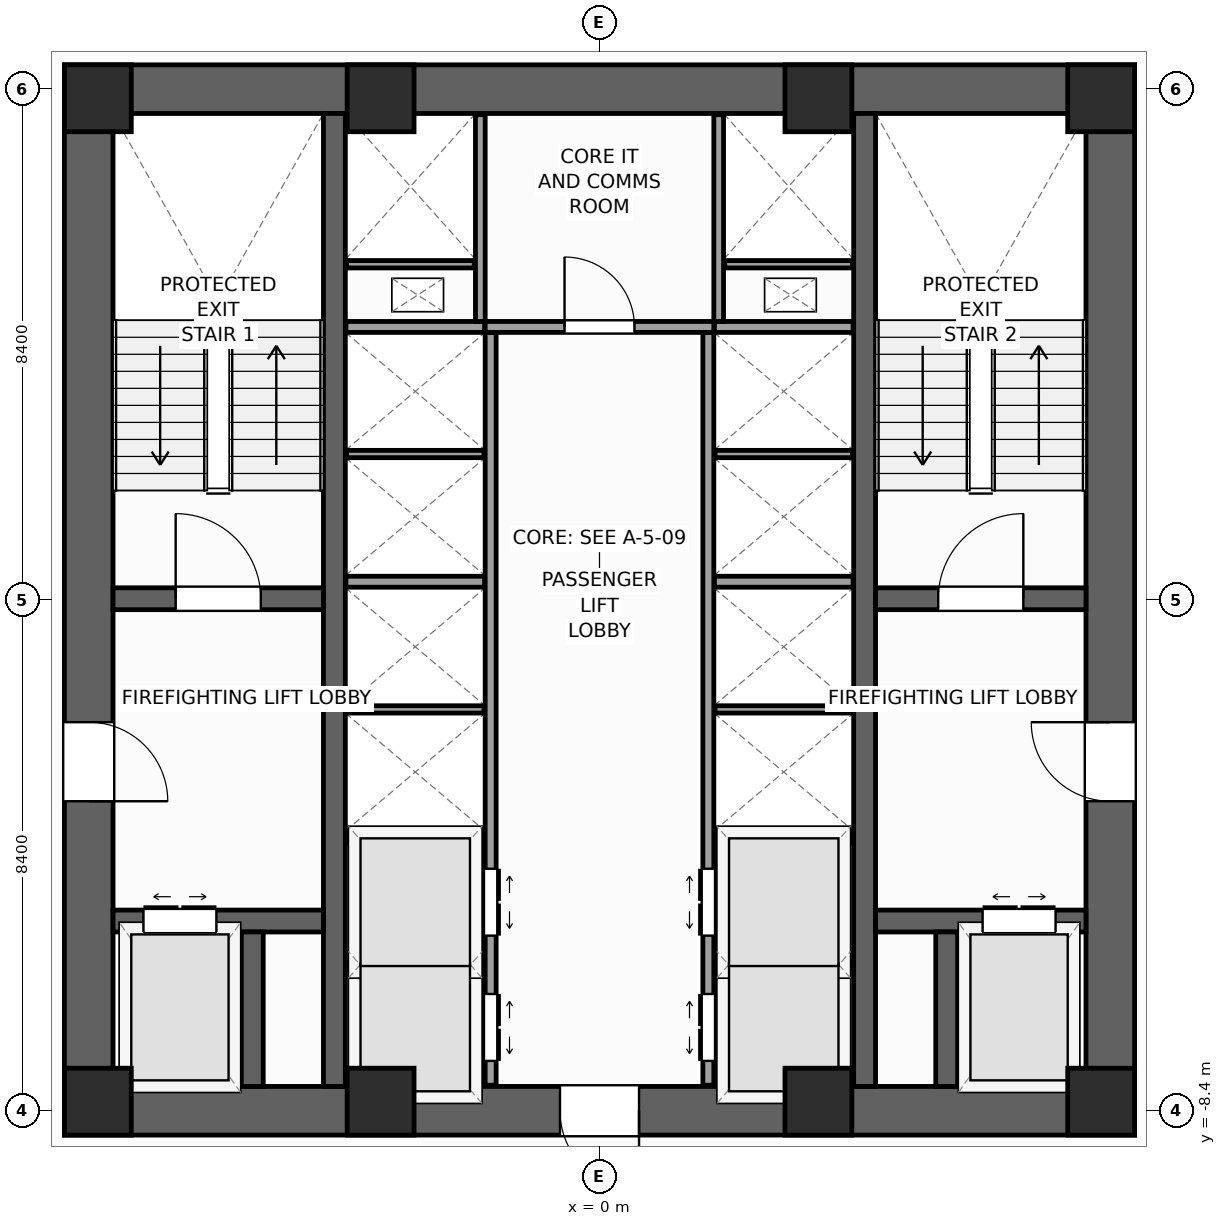
"""IFC4 building model, lengths in metres.
Left out: names, types, materials, properties, quantities, classifications, styles, units other than length and angle.
Written with IfcOpenShell. Run it as: python <this file> out.ifc"""

import sys

from ifc_helpers import new_model, si_unit, direction, frame, frame_2d, origin, origin_2d, place, context, subcontext, project, spatial, rectangle, extrude, source, transform, mapped, element, fill, save


model = new_model("IFC4")
c1 = context("Model", 3, precision=1e-05, world=origin(), true_north=direction((0.0, 1.0)))
c2 = subcontext(c1, "Body", "Model", "MODEL_VIEW")
j1 = project(units=[si_unit("LENGTHUNIT", "METRE"), si_unit("PLANEANGLEUNIT", "RADIAN")], contexts=[c1])
p1 = place(None, origin())
s1 = spatial("IfcSite", under=j1, at=p1, CompositionType="ELEMENT")
p2 = place(p1, origin())
s2 = spatial("IfcBuilding", under=s1, at=p2, CompositionType="ELEMENT")
p3 = place(p2, frame((0.0, 0.0, 70.0)))
s3 = spatial("IfcBuildingStorey", under=s2, at=p3, CompositionType="ELEMENT", Elevation=70.0)
p4 = place(p3, frame((-8.8, -8.4, 0.0), z_axis=(0.0, 0.0, 1.0), x_axis=(1.0, 0.0, 0.0)))
e1 = element("IfcWall", 1, at=p4, inside=s3, PredefinedType="SHEAR", context=c2, shape_type="SweptSolid", body=[
    extrude(rectangle(XDim=17.6, YDim=0.8, at=frame_2d((8.8, 0.0))), origin(), (0.0, 0.0, 1.0), 4.0),
])
p5 = place(p4, frame((8.15, 0.0, 0.0)))
e2 = element("IfcOpeningElement", 2, at=p5, cuts=e1, PredefinedType="OPENING", context=c2, shape_type="SweptSolid", body=[
    extrude(rectangle(XDim=1.3, YDim=2.2, at=frame_2d((0.65, 1.1))), frame((0.0, 0.41, 0.0), z_axis=(0.0, -1.0, 0.0), x_axis=(1.0, 0.0, 0.0)), (0.0, 0.0, 1.0), 0.82),
])
p6 = place(p3, frame((-8.8, 8.4, 0.0), z_axis=(0.0, 0.0, 1.0), x_axis=(1.0, 0.0, 0.0)))
e3 = element("IfcWall", 3, at=p6, inside=s3, PredefinedType="SHEAR", context=c2, shape_type="SweptSolid", body=[
    extrude(rectangle(XDim=17.6, YDim=0.8, at=frame_2d((8.8, 0.0))), origin(), (0.0, 0.0, 1.0), 4.0),
])
p7 = place(p3, frame((-8.4, -8.0, 0.0), z_axis=(0.0, 0.0, 1.0), x_axis=(0.0, 1.0, 0.0)))
e4 = element("IfcWall", 4, at=p7, inside=s3, PredefinedType="SHEAR", context=c2, shape_type="SweptSolid", body=[
    extrude(rectangle(XDim=16.0, YDim=0.8, at=frame_2d((8.0, 0.0))), origin(), (0.0, 0.0, 1.0), 4.0),
])
p8 = place(p7, frame((4.69, 0.0, 0.0)))
e5 = element("IfcOpeningElement", 5, at=p8, cuts=e4, PredefinedType="OPENING", context=c2, shape_type="SweptSolid", body=[
    extrude(rectangle(XDim=1.3, YDim=2.2, at=frame_2d((0.65, 1.1))), frame((0.0, 0.41, 0.0), z_axis=(0.0, -1.0, 0.0), x_axis=(1.0, 0.0, 0.0)), (0.0, 0.0, 1.0), 0.82),
])
p9 = place(p3, frame((8.4, -8.0, 0.0), z_axis=(0.0, 0.0, 1.0), x_axis=(0.0, 1.0, 0.0)))
e6 = element("IfcWall", 6, at=p9, inside=s3, PredefinedType="SHEAR", context=c2, shape_type="SweptSolid", body=[
    extrude(rectangle(XDim=16.0, YDim=0.8, at=frame_2d((8.0, 0.0))), origin(), (0.0, 0.0, 1.0), 4.0),
])
p10 = place(p9, frame((4.69, 0.0, 0.0)))
e7 = element("IfcOpeningElement", 7, at=p10, cuts=e6, PredefinedType="OPENING", context=c2, shape_type="SweptSolid", body=[
    extrude(rectangle(XDim=1.3, YDim=2.2, at=frame_2d((0.65, 1.1))), frame((0.0, 0.41, 0.0), z_axis=(0.0, -1.0, 0.0), x_axis=(1.0, 0.0, 0.0)), (0.0, 0.0, 1.0), 0.82),
])
for number, where, z_axis, x_axis in (
    (8, (-4.36, -8.0, 0.0), (0.0, 0.0, 1.0), (0.0, 1.0, 0.0)),
    (9, (4.36, -8.0, 0.0), (0.0, 0.0, 1.0), (0.0, 1.0, 0.0)),
):
    element("IfcWall", number, at=place(p3, frame(where, z_axis=z_axis, x_axis=x_axis)), inside=s3, PredefinedType="SHEAR", context=c2, shape_type="SweptSolid", body=[
        extrude(rectangle(XDim=16.0, YDim=0.36, at=frame_2d((8.0, 0.0))), origin(), (0.0, 0.0, 1.0), 4.0),
    ])
p11 = place(p3, frame((-8.0, 0.02, 0.0), z_axis=(0.0, 0.0, 1.0), x_axis=(1.0, 0.0, 0.0)))
e10 = element("IfcWall", 10, at=p11, inside=s3, PredefinedType="SHEAR", context=c2, shape_type="SweptSolid", body=[
    extrude(rectangle(XDim=3.46, YDim=0.36, at=frame_2d((1.73, 0.0))), origin(), (0.0, 0.0, 1.0), 4.0),
])
p12 = place(p11, frame((1.03, 0.0, 0.0)))
e11 = element("IfcOpeningElement", 11, at=p12, cuts=e10, PredefinedType="OPENING", context=c2, shape_type="SweptSolid", body=[
    extrude(rectangle(XDim=1.4, YDim=2.2, at=frame_2d((0.7, 1.1))), frame((0.0, 0.19, 0.0), z_axis=(0.0, -1.0, 0.0), x_axis=(1.0, 0.0, 0.0)), (0.0, 0.0, 1.0), 0.38),
])
p13 = place(p3, frame((4.54, 0.02, 0.0), z_axis=(0.0, 0.0, 1.0), x_axis=(1.0, 0.0, 0.0)))
e12 = element("IfcWall", 12, at=p13, inside=s3, PredefinedType="SHEAR", context=c2, shape_type="SweptSolid", body=[
    extrude(rectangle(XDim=3.46, YDim=0.36, at=frame_2d((1.73, 0.0))), origin(), (0.0, 0.0, 1.0), 4.0),
])
p14 = place(p13, frame((1.03, 0.0, 0.0)))
e13 = element("IfcOpeningElement", 13, at=p14, cuts=e12, PredefinedType="OPENING", context=c2, shape_type="SweptSolid", body=[
    extrude(rectangle(XDim=1.4, YDim=2.2, at=frame_2d((0.7, 1.1))), frame((0.0, 0.19, 0.0), z_axis=(0.0, -1.0, 0.0), x_axis=(1.0, 0.0, 0.0)), (0.0, 0.0, 1.0), 0.38),
])
p15 = place(p3, frame((-8.0, -5.28, 0.0), z_axis=(0.0, 0.0, 1.0), x_axis=(1.0, 0.0, 0.0)))
e14 = element("IfcWall", 14, at=p15, inside=s3, PredefinedType="SHEAR", context=c2, shape_type="SweptSolid", body=[
    extrude(rectangle(XDim=3.46, YDim=0.36, at=frame_2d((1.73, 0.0))), origin(), (0.0, 0.0, 1.0), 4.0),
])
p16 = place(p15, frame((0.5, 0.0, 0.0)))
e15 = element("IfcOpeningElement", 15, at=p16, cuts=e14, PredefinedType="OPENING", context=c2, shape_type="SweptSolid", body=[
    extrude(rectangle(XDim=1.2, YDim=2.25, at=frame_2d((0.6, 1.125))), frame((0.0, 0.19, 0.0), z_axis=(0.0, -1.0, 0.0), x_axis=(1.0, 0.0, 0.0)), (0.0, 0.0, 1.0), 0.38),
])
p17 = place(p3, frame((4.54, -5.28, 0.0), z_axis=(0.0, 0.0, 1.0), x_axis=(1.0, 0.0, 0.0)))
e16 = element("IfcWall", 16, at=p17, inside=s3, PredefinedType="SHEAR", context=c2, shape_type="SweptSolid", body=[
    extrude(rectangle(XDim=3.46, YDim=0.36, at=frame_2d((1.73, 0.0))), origin(), (0.0, 0.0, 1.0), 4.0),
])
p18 = place(p17, frame((1.76, 0.0, 0.0)))
e17 = element("IfcOpeningElement", 17, at=p18, cuts=e16, PredefinedType="OPENING", context=c2, shape_type="SweptSolid", body=[
    extrude(rectangle(XDim=1.2, YDim=2.25, at=frame_2d((0.6, 1.125))), frame((0.0, 0.19, 0.0), z_axis=(0.0, -1.0, 0.0), x_axis=(1.0, 0.0, 0.0)), (0.0, 0.0, 1.0), 0.38),
])
for number, where, z_axis, x_axis in (
    (18, (-5.71, -8.0, 0.0), (0.0, 0.0, 1.0), (0.0, 1.0, 0.0)),
    (19, (5.71, -8.0, 0.0), (0.0, 0.0, 1.0), (0.0, 1.0, 0.0)),
):
    element("IfcWall", number, at=place(p3, frame(where, z_axis=z_axis, x_axis=x_axis)), inside=s3, PredefinedType="SHEAR", context=c2, shape_type="SweptSolid", body=[
        extrude(rectangle(XDim=2.54, YDim=0.36, at=frame_2d((1.27, 0.0))), origin(), (0.0, 0.0, 1.0), 4.0),
    ])
m1 = source(origin(), c2, "Body", "SweptSolid", [
    extrude(rectangle(XDim=1.1, YDim=1.1, at=origin_2d()), origin(), (0.0, 0.0, 1.0), 4.0),
])
for number, where, z_axis, x_axis in (
    (20, (-8.25, -8.25, 0.0), (0.0, 0.0, 1.0), (1.0, 0.0, 0.0)),
    (21, (8.25, -8.25, 0.0), (0.0, 0.0, 1.0), (1.0, 0.0, 0.0)),
    (22, (8.25, 8.25, 0.0), (0.0, 0.0, 1.0), (1.0, 0.0, 0.0)),
    (23, (-8.25, 8.25, 0.0), (0.0, 0.0, 1.0), (1.0, 0.0, 0.0)),
    (24, (-3.6, -8.25, 0.0), (0.0, 0.0, 1.0), (1.0, 0.0, 0.0)),
    (25, (3.6, -8.25, 0.0), (0.0, 0.0, 1.0), (1.0, 0.0, 0.0)),
    (26, (-3.6, 8.25, 0.0), (0.0, 0.0, 1.0), (1.0, 0.0, 0.0)),
    (27, (3.6, 8.25, 0.0), (0.0, 0.0, 1.0), (1.0, 0.0, 0.0)),
):
    element("IfcColumn", number, at=place(p3, frame(where, z_axis=z_axis, x_axis=x_axis)), inside=s3, PredefinedType="PILASTER", context=c2, shape_type="MappedRepresentation", body=[
        mapped(m1, transform((0.0, 0.0, 0.0), scale=1.0)),
    ])
p19 = place(p3, frame((-1.79, -7.98, 0.0), z_axis=(0.0, 0.0, 1.0), x_axis=(0.0, 1.0, 0.0)))
e28 = element("IfcWall", 28, at=p19, inside=s3, PredefinedType="PARTITIONING", context=c2, shape_type="SweptSolid", body=[
    extrude(rectangle(XDim=12.38, YDim=0.18, at=frame_2d((6.19, 0.0))), origin(), (0.0, 0.0, 1.0), 3.72),
])
p20 = place(p19, frame((0.4, 0.0, 0.0)))
e29 = element("IfcOpeningElement", 29, at=p20, cuts=e28, PredefinedType="OPENING", context=c2, shape_type="SweptSolid", body=[
    extrude(rectangle(XDim=1.1, YDim=2.2, at=frame_2d((0.55, 1.1))), frame((0.0, 0.1, 0.0), z_axis=(0.0, -1.0, 0.0), x_axis=(1.0, 0.0, 0.0)), (0.0, 0.0, 1.0), 0.2),
])
p21 = place(p19, frame((2.46, 0.0, 0.0)))
e30 = element("IfcOpeningElement", 30, at=p21, cuts=e28, PredefinedType="OPENING", context=c2, shape_type="SweptSolid", body=[
    extrude(rectangle(XDim=1.1, YDim=2.2, at=frame_2d((0.55, 1.1))), frame((0.0, 0.1, 0.0), z_axis=(0.0, -1.0, 0.0), x_axis=(1.0, 0.0, 0.0)), (0.0, 0.0, 1.0), 0.2),
])
p22 = place(p3, frame((1.79, -7.98, 0.0), z_axis=(0.0, 0.0, 1.0), x_axis=(0.0, 1.0, 0.0)))
e31 = element("IfcWall", 31, at=p22, inside=s3, PredefinedType="PARTITIONING", context=c2, shape_type="SweptSolid", body=[
    extrude(rectangle(XDim=12.38, YDim=0.18, at=frame_2d((6.19, 0.0))), origin(), (0.0, 0.0, 1.0), 3.72),
])
p23 = place(p22, frame((0.4, 0.0, 0.0)))
e32 = element("IfcOpeningElement", 32, at=p23, cuts=e31, PredefinedType="OPENING", context=c2, shape_type="SweptSolid", body=[
    extrude(rectangle(XDim=1.1, YDim=2.2, at=frame_2d((0.55, 1.1))), frame((0.0, 0.1, 0.0), z_axis=(0.0, -1.0, 0.0), x_axis=(1.0, 0.0, 0.0)), (0.0, 0.0, 1.0), 0.2),
])
p24 = place(p22, frame((2.46, 0.0, 0.0)))
e33 = element("IfcOpeningElement", 33, at=p24, cuts=e31, PredefinedType="OPENING", context=c2, shape_type="SweptSolid", body=[
    extrude(rectangle(XDim=1.1, YDim=2.2, at=frame_2d((0.55, 1.1))), frame((0.0, 0.1, 0.0), z_axis=(0.0, -1.0, 0.0), x_axis=(1.0, 0.0, 0.0)), (0.0, 0.0, 1.0), 0.2),
])
p25 = place(p3, frame((-1.88, 4.49, 0.0), z_axis=(0.0, 0.0, 1.0), x_axis=(1.0, 0.0, 0.0)))
e34 = element("IfcWall", 34, at=p25, inside=s3, PredefinedType="PARTITIONING", context=c2, shape_type="SweptSolid", body=[
    extrude(rectangle(XDim=3.76, YDim=0.18, at=frame_2d((1.88, 0.0))), origin(), (0.0, 0.0, 1.0), 3.72),
])
p26 = place(p25, frame((1.305, 0.0, 0.0)))
e35 = element("IfcOpeningElement", 35, at=p26, cuts=e34, PredefinedType="OPENING", context=c2, shape_type="SweptSolid", body=[
    extrude(rectangle(XDim=1.15, YDim=2.25, at=frame_2d((0.575, 1.125))), frame((0.0, 0.1, 0.0), z_axis=(0.0, -1.0, 0.0), x_axis=(1.0, 0.0, 0.0)), (0.0, 0.0, 1.0), 0.2),
])
for number, where, z_axis, x_axis in (
    (36, (-4.17, -3.9, 0.0), (0.0, 0.0, 1.0), (1.0, 0.0, 0.0)),
    (37, (1.89, -3.9, 0.0), (0.0, 0.0, 1.0), (1.0, 0.0, 0.0)),
    (38, (-4.17, 0.3, 0.0), (0.0, 0.0, 1.0), (1.0, 0.0, 0.0)),
    (39, (1.89, 0.3, 0.0), (0.0, 0.0, 1.0), (1.0, 0.0, 0.0)),
    (40, (-4.17, 4.49, 0.0), (0.0, 0.0, 1.0), (1.0, 0.0, 0.0)),
    (41, (1.89, 4.49, 0.0), (0.0, 0.0, 1.0), (1.0, 0.0, 0.0)),
):
    element("IfcWall", number, at=place(p3, frame(where, z_axis=z_axis, x_axis=x_axis)), inside=s3, PredefinedType="PARTITIONING", context=c2, shape_type="SweptSolid", body=[
        extrude(rectangle(XDim=2.28, YDim=0.18, at=frame_2d((1.14, 0.0))), origin(), (0.0, 0.0, 1.0), 3.72),
    ])
for number, where, z_axis, x_axis in (
    (42, (-4.16, -6.0, 0.0), (0.0, 0.0, 1.0), (1.0, 0.0, 0.0)),
    (43, (1.9, -6.0, 0.0), (0.0, 0.0, 1.0), (1.0, 0.0, 0.0)),
    (44, (-4.16, -1.8, 0.0), (0.0, 0.0, 1.0), (1.0, 0.0, 0.0)),
    (45, (1.9, -1.8, 0.0), (0.0, 0.0, 1.0), (1.0, 0.0, 0.0)),
    (46, (-4.16, 2.4, 0.0), (0.0, 0.0, 1.0), (1.0, 0.0, 0.0)),
    (47, (1.9, 2.4, 0.0), (0.0, 0.0, 1.0), (1.0, 0.0, 0.0)),
):
    element("IfcWall", number, at=place(p3, frame(where, z_axis=z_axis, x_axis=x_axis)), inside=s3, PredefinedType="PARTITIONING", context=c2, shape_type="SweptSolid", body=[
        extrude(rectangle(XDim=2.26, YDim=0.12, at=frame_2d((1.13, 0.0))), origin(), (0.0, 0.0, 1.0), 3.72),
    ])
for number, where, z_axis, x_axis in (
    (48, (-1.96, 4.58, 0.0), (0.0, 0.0, 1.0), (0.0, 1.0, 0.0)),
    (49, (1.96, 4.58, 0.0), (0.0, 0.0, 1.0), (0.0, 1.0, 0.0)),
):
    element("IfcWall", number, at=place(p3, frame(where, z_axis=z_axis, x_axis=x_axis)), inside=s3, PredefinedType="PARTITIONING", context=c2, shape_type="SweptSolid", body=[
        extrude(rectangle(XDim=3.4, YDim=0.16, at=frame_2d((1.7, 0.0))), origin(), (0.0, 0.0, 1.0), 3.72),
    ])
for number, where, z_axis, x_axis in (
    (50, (-4.16, 5.52, 0.0), (0.0, 0.0, 1.0), (1.0, 0.0, 0.0)),
    (51, (2.06, 5.52, 0.0), (0.0, 0.0, 1.0), (1.0, 0.0, 0.0)),
):
    element("IfcWall", number, at=place(p3, frame(where, z_axis=z_axis, x_axis=x_axis)), inside=s3, PredefinedType="PARTITIONING", context=c2, shape_type="SweptSolid", body=[
        extrude(rectangle(XDim=2.1, YDim=0.12, at=frame_2d((1.05, 0.0))), origin(), (0.0, 0.0, 1.0), 3.72),
    ])
m2 = source(origin(), c2, "Body", "SweptSolid", [
    extrude(rectangle(XDim=1.4, YDim=2.2, at=frame_2d((0.7, 1.1))), frame((0.0, 0.025, 0.0), z_axis=(0.0, -1.0, 0.0), x_axis=(1.0, 0.0, 0.0)), (0.0, 0.0, 1.0), 0.05),
])
p27 = place(p12, origin())
e52 = element("IfcDoor", 52, at=p27, inside=s3, OperationType="SINGLE_SWING_LEFT", PredefinedType="DOOR", context=c2, shape_type="MappedRepresentation", body=[
    mapped(m2, transform((0.0, 0.0, 0.0), scale=1.0)),
])
fill(e11, e52)
p28 = place(p14, origin())
e53 = element("IfcDoor", 53, at=p28, inside=s3, OperationType="SINGLE_SWING_RIGHT", PredefinedType="DOOR", context=c2, shape_type="MappedRepresentation", body=[
    mapped(m2, transform((0.0, 0.0, 0.0), scale=1.0)),
])
fill(e13, e53)
m3 = source(origin(), c2, "Body", "SweptSolid", [
    extrude(rectangle(XDim=1.3, YDim=2.2, at=frame_2d((0.65, 1.1))), frame((0.0, 0.025, 0.0), z_axis=(0.0, -1.0, 0.0), x_axis=(1.0, 0.0, 0.0)), (0.0, 0.0, 1.0), 0.05),
])
p29 = place(p8, frame((1.3, 0.0, 0.0), z_axis=(0.0, 0.0, 1.0), x_axis=(-1.0, 0.0, 0.0)))
e54 = element("IfcDoor", 54, at=p29, inside=s3, OperationType="SINGLE_SWING_LEFT", PredefinedType="DOOR", context=c2, shape_type="MappedRepresentation", body=[
    mapped(m3, transform((0.0, 0.0, 0.0), scale=1.0)),
])
fill(e5, e54)
p30 = place(p10, origin())
e55 = element("IfcDoor", 55, at=p30, inside=s3, OperationType="SINGLE_SWING_RIGHT", PredefinedType="DOOR", context=c2, shape_type="MappedRepresentation", body=[
    mapped(m3, transform((0.0, 0.0, 0.0), scale=1.0)),
])
fill(e7, e55)
p31 = place(p5, frame((1.3, 0.0, 0.0), z_axis=(0.0, 0.0, 1.0), x_axis=(-1.0, 0.0, 0.0)))
e56 = element("IfcDoor", 56, at=p31, inside=s3, OperationType="SINGLE_SWING_RIGHT", PredefinedType="DOOR", context=c2, shape_type="MappedRepresentation", body=[
    mapped(m3, transform((0.0, 0.0, 0.0), scale=1.0)),
])
fill(e2, e56)
m4 = source(origin(), c2, "Body", "SweptSolid", [
    extrude(rectangle(XDim=1.2, YDim=2.25, at=frame_2d((0.6, 1.125))), frame((0.0, 0.025, 0.0), z_axis=(0.0, -1.0, 0.0), x_axis=(1.0, 0.0, 0.0)), (0.0, 0.0, 1.0), 0.05),
])
p32 = place(p16, origin())
e57 = element("IfcDoor", 57, at=p32, inside=s3, OperationType="DOUBLE_DOOR_SLIDING", PredefinedType="DOOR", context=c2, shape_type="MappedRepresentation", body=[
    mapped(m4, transform((0.0, 0.0, 0.0), scale=1.0)),
])
fill(e15, e57)
p33 = place(p18, origin())
e58 = element("IfcDoor", 58, at=p33, inside=s3, OperationType="DOUBLE_DOOR_SLIDING", PredefinedType="DOOR", context=c2, shape_type="MappedRepresentation", body=[
    mapped(m4, transform((0.0, 0.0, 0.0), scale=1.0)),
])
fill(e17, e58)
m5 = source(origin(), c2, "Body", "SweptSolid", [
    extrude(rectangle(XDim=1.1, YDim=2.2, at=frame_2d((0.55, 1.1))), frame((0.0, 0.025, 0.0), z_axis=(0.0, -1.0, 0.0), x_axis=(1.0, 0.0, 0.0)), (0.0, 0.0, 1.0), 0.05),
])
p34 = place(p20, frame((1.1, 0.0, 0.0), z_axis=(0.0, 0.0, 1.0), x_axis=(-1.0, 0.0, 0.0)))
e59 = element("IfcDoor", 59, at=p34, inside=s3, OperationType="DOUBLE_DOOR_SLIDING", PredefinedType="DOOR", context=c2, shape_type="MappedRepresentation", body=[
    mapped(m5, transform((0.0, 0.0, 0.0), scale=1.0)),
])
fill(e29, e59)
p35 = place(p21, frame((1.1, 0.0, 0.0), z_axis=(0.0, 0.0, 1.0), x_axis=(-1.0, 0.0, 0.0)))
e60 = element("IfcDoor", 60, at=p35, inside=s3, OperationType="DOUBLE_DOOR_SLIDING", PredefinedType="DOOR", context=c2, shape_type="MappedRepresentation", body=[
    mapped(m5, transform((0.0, 0.0, 0.0), scale=1.0)),
])
fill(e30, e60)
p36 = place(p23, origin())
e61 = element("IfcDoor", 61, at=p36, inside=s3, OperationType="DOUBLE_DOOR_SLIDING", PredefinedType="DOOR", context=c2, shape_type="MappedRepresentation", body=[
    mapped(m5, transform((0.0, 0.0, 0.0), scale=1.0)),
])
fill(e32, e61)
p37 = place(p24, origin())
e62 = element("IfcDoor", 62, at=p37, inside=s3, OperationType="DOUBLE_DOOR_SLIDING", PredefinedType="DOOR", context=c2, shape_type="MappedRepresentation", body=[
    mapped(m5, transform((0.0, 0.0, 0.0), scale=1.0)),
])
fill(e33, e62)
m6 = source(origin(), c2, "Body", "SweptSolid", [
    extrude(rectangle(XDim=1.15, YDim=2.25, at=frame_2d((0.575, 1.125))), frame((0.0, 0.025, 0.0), z_axis=(0.0, -1.0, 0.0), x_axis=(1.0, 0.0, 0.0)), (0.0, 0.0, 1.0), 0.05),
])
p38 = place(p26, origin())
e63 = element("IfcDoor", 63, at=p38, inside=s3, OperationType="SINGLE_SWING_LEFT", PredefinedType="DOOR", context=c2, shape_type="MappedRepresentation", body=[
    mapped(m6, transform((0.0, 0.0, 0.0), scale=1.0)),
])
fill(e35, e63)
save(model, sys.argv[1])
